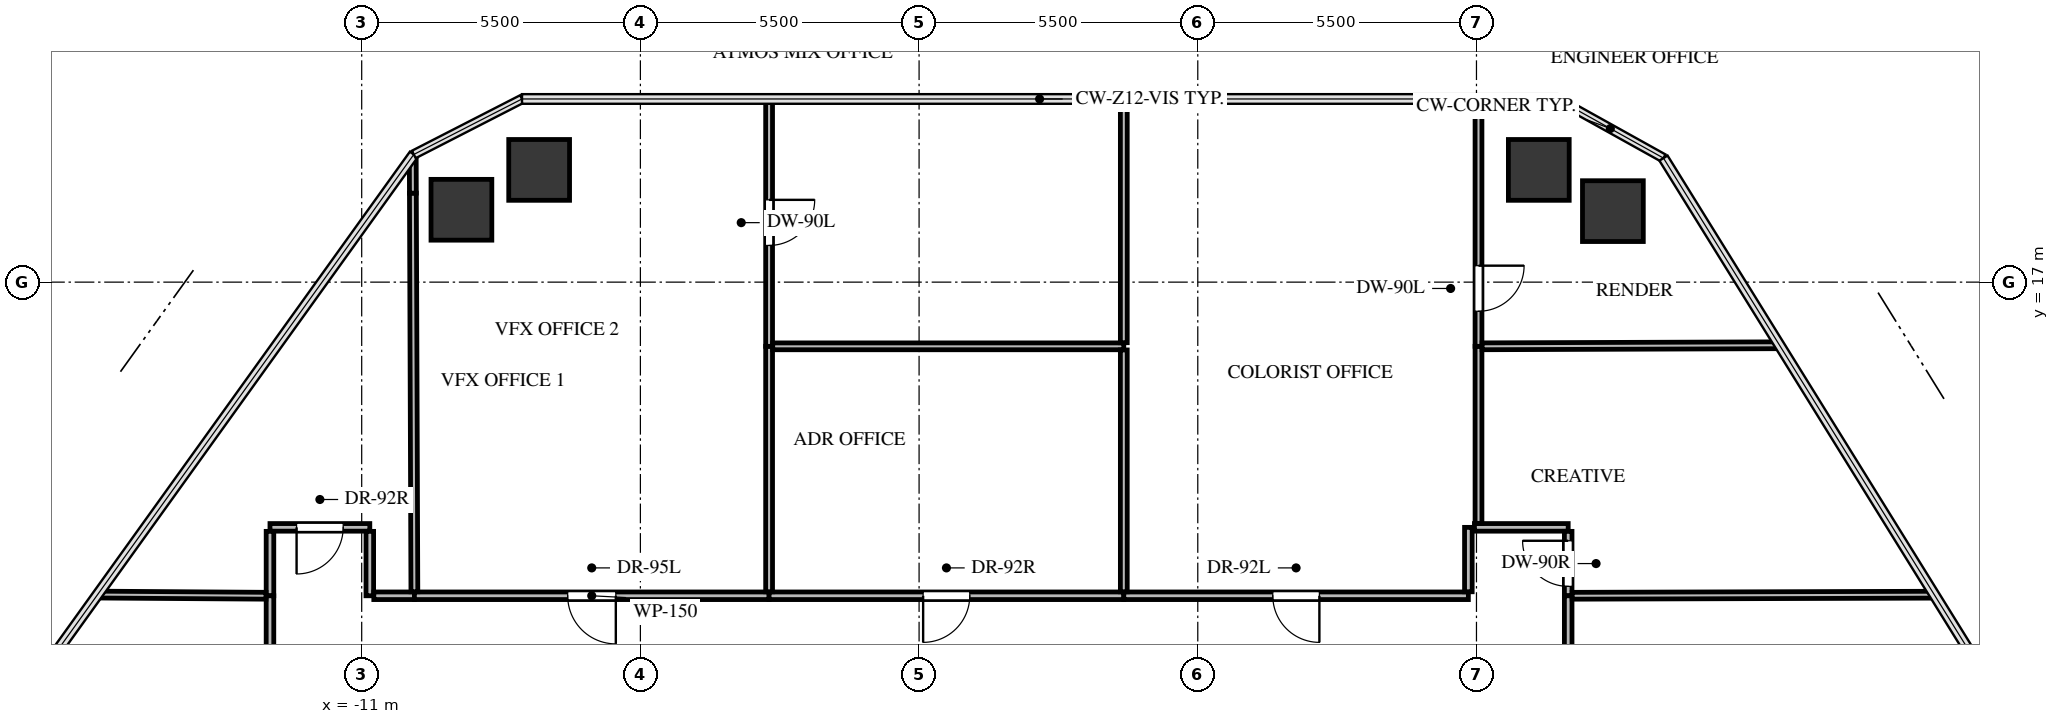
"""IFC4 building model, lengths in metres.
Left out: names, types, materials, properties, quantities, classifications, styles, units other than length and angle.
Written with IfcOpenShell. Run it as: python <this file> out.ifc"""

import sys

from ifc_helpers import new_model, si_unit, direction, frame, frame_2d, origin, origin_2d, place, context, subcontext, project, spatial, rectangle, extrude, source, transform, mapped, element, fill, save


model = new_model("IFC4")
c1 = context("Model", 3, precision=1e-05, world=origin(), true_north=direction((0.0, 1.0)))
c2 = subcontext(c1, "Body", "Model", "MODEL_VIEW")
j1 = project(units=[si_unit("LENGTHUNIT", "METRE"), si_unit("PLANEANGLEUNIT", "RADIAN")], contexts=[c1])
p1 = place(None, origin())
s1 = spatial("IfcSite", under=j1, at=p1, CompositionType="ELEMENT")
p2 = place(p1, origin())
s2 = spatial("IfcBuilding", under=s1, at=p2, CompositionType="ELEMENT")
p3 = place(p2, frame((0.0, 0.0, 110.7)))
s3 = spatial("IfcBuildingStorey", under=s2, at=p3, CompositionType="ELEMENT", Elevation=110.7)
m1 = source(origin(), c2, "Body", "SweptSolid", [
    extrude(rectangle(XDim=1.2, YDim=1.2, at=origin_2d()), origin(), (0.0, 0.0, 1.0), 3.3),
])
for number, where, z_axis, x_axis in (
    (1, (-9.032, 18.428, -0.24), (0.0, 0.0, 1.0), (1.0, 0.0, 0.0)),
    (2, (-7.498, 19.215, -0.24), (0.0, 0.0, 1.0), (1.0, 0.0, 0.0)),
    (3, (12.23, 19.215, -0.24), (0.0, 0.0, 1.0), (1.0, 0.0, 0.0)),
    (4, (13.692, 18.401, -0.24), (0.0, 0.0, 1.0), (1.0, 0.0, 0.0)),
):
    element("IfcColumn", number, at=place(p3, frame(where, z_axis=z_axis, x_axis=x_axis)), inside=s3, PredefinedType="COLUMN", context=c2, shape_type="MappedRepresentation", body=[
        mapped(m1, transform((0.0, 0.0, 0.0), x_axis=(1.0, 0.0, 0.0), y_axis=(0.0, 1.0, 0.0), z_axis=(0.0, 0.0, 1.0), scale=1.0)),
    ])
p4 = place(p3, frame((-10.84, 12.16, 0.0), z_axis=(0.0, 0.0, 1.0), x_axis=(-1.0, 0.0, 0.0)))
e5 = element("IfcWall", 5, at=p4, inside=s3, PredefinedType="PARTITIONING", context=c2, shape_type="SweptSolid", body=[
    extrude(rectangle(XDim=1.97, YDim=0.15, at=frame_2d((0.985, 0.0))), origin(), (0.0, 0.0, 1.0), 3.045),
])
p5 = place(p4, frame((0.525, 0.0, 0.0)))
e6 = element("IfcOpeningElement", 6, at=p5, cuts=e5, PredefinedType="OPENING", context=c2, shape_type="SweptSolid", body=[
    extrude(rectangle(XDim=0.92, YDim=2.1, at=frame_2d((0.46, 1.05))), frame((0.0, 0.085, 0.0), z_axis=(0.0, -1.0, 0.0), x_axis=(1.0, 0.0, 0.0)), (0.0, 0.0, 1.0), 0.17),
])
for number, where, z_axis, x_axis in (
    (7, (-10.84, 10.81, 0.0), (0.0, 0.0, 1.0), (0.0, 1.0, 0.0)),
    (8, (-12.81, 12.081, 0.0), (0.0, 0.0, 1.0), (0.0, -1.0, 0.0)),
):
    element("IfcWall", number, at=place(p3, frame(where, z_axis=z_axis, x_axis=x_axis)), inside=s3, PredefinedType="PARTITIONING", context=c2, shape_type="SweptSolid", body=[
        extrude(rectangle(XDim=1.271, YDim=0.15, at=frame_2d((0.635, 0.0))), origin(), (0.0, 0.0, 1.0), 3.045),
    ])
p6 = place(p3, frame((-9.96, 10.81, 0.0), z_axis=(0.0, 0.0, 1.0), x_axis=(-1.0, 0.0, 0.0)))
e9 = element("IfcWall", 9, at=p6, inside=s3, PredefinedType="PARTITIONING", context=c2, shape_type="SweptSolid", body=[
    extrude(rectangle(XDim=0.801, YDim=0.15, at=frame_2d((0.4, 0.0))), origin(), (0.0, 0.0, 1.0), 3.045),
])
p7 = place(p3, frame((-2.96, 10.81, 0.0), z_axis=(0.0, 0.0, 1.0), x_axis=(-1.0, 0.0, 0.0)))
e10 = element("IfcWall", 10, at=p7, inside=s3, PredefinedType="PARTITIONING", context=c2, shape_type="SweptSolid", body=[
    extrude(rectangle(XDim=7.0, YDim=0.15, at=frame_2d((3.5, 0.0))), origin(), (0.0, 0.0, 1.0), 2.212),
])
p8 = place(p7, frame((3.025, 0.0, 0.0)))
e11 = element("IfcOpeningElement", 11, at=p8, cuts=e10, PredefinedType="OPENING", context=c2, shape_type="SweptSolid", body=[
    extrude(rectangle(XDim=0.95, YDim=2.1, at=frame_2d((0.475, 1.05))), frame((0.0, 0.085, 0.0), z_axis=(0.0, -1.0, 0.0), x_axis=(1.0, 0.0, 0.0)), (0.0, 0.0, 1.0), 0.17),
])
p9 = place(p3, frame((4.04, 10.81, 0.0), z_axis=(0.0, 0.0, 1.0), x_axis=(-1.0, 0.0, 0.0)))
e12 = element("IfcWall", 12, at=p9, inside=s3, PredefinedType="PARTITIONING", context=c2, shape_type="SweptSolid", body=[
    extrude(rectangle(XDim=7.0, YDim=0.15, at=frame_2d((3.5, 0.0))), origin(), (0.0, 0.0, 1.0), 3.045),
])
p10 = place(p9, frame((3.04, 0.0, 0.0)))
e13 = element("IfcOpeningElement", 13, at=p10, cuts=e12, PredefinedType="OPENING", context=c2, shape_type="SweptSolid", body=[
    extrude(rectangle(XDim=0.92, YDim=2.1, at=frame_2d((0.46, 1.05))), frame((0.0, 0.085, 0.0), z_axis=(0.0, -1.0, 0.0), x_axis=(1.0, 0.0, 0.0)), (0.0, 0.0, 1.0), 0.17),
])
p11 = place(p3, frame((10.84, 10.81, 0.0), z_axis=(0.0, 0.0, 1.0), x_axis=(-1.0, 0.0, 0.0)))
e14 = element("IfcWall", 14, at=p11, inside=s3, PredefinedType="PARTITIONING", context=c2, shape_type="SweptSolid", body=[
    extrude(rectangle(XDim=6.8, YDim=0.15, at=frame_2d((3.4, 0.0))), origin(), (0.0, 0.0, 1.0), 2.212),
])
p12 = place(p11, frame((2.94, 0.0, 0.0)))
e15 = element("IfcOpeningElement", 15, at=p12, cuts=e14, PredefinedType="OPENING", context=c2, shape_type="SweptSolid", body=[
    extrude(rectangle(XDim=0.92, YDim=2.1, at=frame_2d((0.46, 1.05))), frame((0.0, 0.085, 0.0), z_axis=(0.0, -1.0, 0.0), x_axis=(1.0, 0.0, 0.0)), (0.0, 0.0, 1.0), 0.17),
])
p13 = place(p3, frame((10.84, 12.16, 0.0), z_axis=(0.0, 0.0, 1.0), x_axis=(0.0, -1.0, 0.0)))
e16 = element("IfcWall", 16, at=p13, inside=s3, PredefinedType="PARTITIONING", context=c2, shape_type="SweptSolid", body=[
    extrude(rectangle(XDim=1.271, YDim=0.15, at=frame_2d((0.635, 0.0))), origin(), (0.0, 0.0, 1.0), 2.212),
])
p14 = place(p3, frame((12.81, 12.16, 0.0), z_axis=(0.0, 0.0, 1.0), x_axis=(-1.0, 0.0, 0.0)))
e17 = element("IfcWall", 17, at=p14, inside=s3, PredefinedType="PARTITIONING", context=c2, shape_type="SweptSolid", body=[
    extrude(rectangle(XDim=1.85, YDim=0.15, at=frame_2d((0.925, 0.0))), origin(), (0.0, 0.0, 1.0), 2.212),
])
p15 = place(p3, frame((12.81, 10.81, 0.0), z_axis=(0.0, 0.0, 1.0), x_axis=(0.0, 1.0, 0.0)))
e18 = element("IfcWall", 18, at=p15, inside=s3, PredefinedType="PARTITIONING", context=c2, shape_type="SweptSolid", body=[
    extrude(rectangle(XDim=1.271, YDim=0.15, at=frame_2d((0.635, 0.0))), origin(), (0.0, 0.0, 1.0), 3.045),
])
p16 = place(p15, frame((0.186, 0.0, 0.0)))
e19 = element("IfcOpeningElement", 19, at=p16, cuts=e18, PredefinedType="OPENING", context=c2, shape_type="SweptSolid", body=[
    extrude(rectangle(XDim=0.9, YDim=2.05, at=frame_2d((0.45, 1.025))), frame((0.0, 0.085, 0.0), z_axis=(0.0, -1.0, 0.0), x_axis=(1.0, 0.0, 0.0)), (0.0, 0.0, 1.0), 0.17),
])
p17 = place(p3, frame((-12.81, 10.81, 0.0), z_axis=(0.0, 0.0, 1.0), x_axis=(0.0, -1.0, 0.0)))
e20 = element("IfcWall", 20, at=p17, inside=s3, PredefinedType="PARTITIONING", context=c2, shape_type="SweptSolid", body=[
    extrude(rectangle(XDim=6.27, YDim=0.15, at=frame_2d((3.135, 0.0))), origin(), (0.0, 0.0, 1.0), 3.045),
])
p18 = place(p17, frame((2.675, 0.0, 0.0)))
e21 = element("IfcOpeningElement", 21, at=p18, cuts=e20, PredefinedType="OPENING", context=c2, shape_type="SweptSolid", body=[
    extrude(rectangle(XDim=0.92, YDim=2.1, at=frame_2d((0.46, 1.05))), frame((0.0, 0.085, 0.0), z_axis=(0.0, -1.0, 0.0), x_axis=(1.0, 0.0, 0.0)), (0.0, 0.0, 1.0), 0.17),
])
p19 = place(p3, frame((12.81, 5.04, 0.0), z_axis=(0.0, 0.0, 1.0), x_axis=(0.0, 1.0, 0.0)))
e22 = element("IfcWall", 22, at=p19, inside=s3, PredefinedType="PARTITIONING", context=c2, shape_type="SweptSolid", body=[
    extrude(rectangle(XDim=5.77, YDim=0.15, at=frame_2d((2.885, 0.0))), origin(), (0.0, 0.0, 1.0), 3.045),
])
p20 = place(p19, frame((2.425, 0.0, 0.0)))
e23 = element("IfcOpeningElement", 23, at=p20, cuts=e22, PredefinedType="OPENING", context=c2, shape_type="SweptSolid", body=[
    extrude(rectangle(XDim=0.92, YDim=2.1, at=frame_2d((0.46, 1.05))), frame((0.0, 0.085, 0.0), z_axis=(0.0, -1.0, 0.0), x_axis=(1.0, 0.0, 0.0)), (0.0, 0.0, 1.0), 0.17),
])
p21 = place(p3, frame((-9.99, 18.756, 0.0), z_axis=(0.0, 0.0, 1.0), x_axis=(0.003754822251, -0.99999295063, 0.0)))
e24 = element("IfcWall", 24, at=p21, inside=s3, PredefinedType="PARTITIONING", context=c2, shape_type="SweptSolid", body=[
    extrude(rectangle(XDim=7.867, YDim=0.135, at=frame_2d((3.934, 0.0))), origin(), (0.0, 0.0, 1.0), 2.38),
])
p22 = place(p3, frame((-9.992, 19.479, 0.0), z_axis=(0.0, 0.0, 1.0), x_axis=(0.003718703158, -0.9999930856, 0.0)))
e25 = element("IfcWall", 25, at=p22, inside=s3, PredefinedType="PARTITIONING", context=c2, shape_type="SweptSolid", body=[
    extrude(rectangle(XDim=0.722, YDim=0.135, at=frame_2d((0.361, 0.0))), origin(), (0.0, 0.0, 1.0), 1.877),
])
p23 = place(p3, frame((-12.889, 10.811, 0.0), z_axis=(0.0, 0.0, 1.0), x_axis=(-0.999976657862, 0.006832549348, 0.0)))
e26 = element("IfcWall", 26, at=p23, inside=s3, PredefinedType="PARTITIONING", context=c2, shape_type="SweptSolid", body=[
    extrude(rectangle(XDim=3.323, YDim=0.135, at=frame_2d((1.662, 0.0))), origin(), (0.0, 0.0, 1.0), 2.38),
])
p24 = place(p3, frame((-2.96, 15.733, 0.0), z_axis=(0.0, 0.0, 1.0), x_axis=(0.0, -1.0, 0.0)))
e27 = element("IfcWall", 27, at=p24, inside=s3, PredefinedType="PARTITIONING", context=c2, shape_type="SweptSolid", body=[
    extrude(rectangle(XDim=4.844, YDim=0.135, at=frame_2d((2.422, 0.0))), origin(), (0.0, 0.0, 1.0), 3.045),
])
p25 = place(p3, frame((-2.96, 20.615, 0.0), z_axis=(0.0, 0.0, 1.0), x_axis=(0.0, -1.0, 0.0)))
e28 = element("IfcWall", 28, at=p25, inside=s3, PredefinedType="PARTITIONING", context=c2, shape_type="SweptSolid", body=[
    extrude(rectangle(XDim=4.882, YDim=0.135, at=frame_2d((2.441, 0.0))), origin(), (0.0, 0.0, 1.0), 2.38),
])
p26 = place(p25, frame((1.991, 0.0, 0.0)))
e29 = element("IfcOpeningElement", 29, at=p26, cuts=e28, PredefinedType="OPENING", context=c2, shape_type="SweptSolid", body=[
    extrude(rectangle(XDim=0.9, YDim=2.05, at=frame_2d((0.45, 1.025))), frame((0.0, 0.078, 0.0), z_axis=(0.0, -1.0, 0.0), x_axis=(1.0, 0.0, 0.0)), (0.0, 0.0, 1.0), 0.155),
])
p27 = place(p3, frame((-2.888, 15.733, 0.0), z_axis=(0.0, 0.0, 1.0), x_axis=(1.0, 0.0, 0.0)))
e30 = element("IfcWall", 30, at=p27, inside=s3, PredefinedType="PARTITIONING", context=c2, shape_type="SweptSolid", body=[
    extrude(rectangle(XDim=6.928, YDim=0.135, at=frame_2d((3.464, 0.0))), origin(), (0.0, 0.0, 1.0), 3.045),
])
p28 = place(p3, frame((4.04, 15.662, 0.0), z_axis=(0.0, 0.0, 1.0), x_axis=(0.0, -1.0, 0.0)))
e31 = element("IfcWall", 31, at=p28, inside=s3, PredefinedType="PARTITIONING", context=c2, shape_type="SweptSolid", body=[
    extrude(rectangle(XDim=4.773, YDim=0.135, at=frame_2d((2.386, 0.0))), origin(), (0.0, 0.0, 1.0), 3.045),
])
p29 = place(p3, frame((4.04, 20.615, 0.0), z_axis=(0.0, 0.0, 1.0), x_axis=(0.0, -1.0, 0.0)))
e32 = element("IfcWall", 32, at=p29, inside=s3, PredefinedType="PARTITIONING", context=c2, shape_type="SweptSolid", body=[
    extrude(rectangle(XDim=4.811, YDim=0.135, at=frame_2d((2.405, 0.0))), origin(), (0.0, 0.0, 1.0), 2.38),
])
p30 = place(p3, frame((11.04, 15.733, 0.0), z_axis=(0.0, 0.0, 1.0), x_axis=(0.0, -1.0, 0.0)))
e33 = element("IfcWall", 33, at=p30, inside=s3, PredefinedType="PARTITIONING", context=c2, shape_type="SweptSolid", body=[
    extrude(rectangle(XDim=3.494, YDim=0.135, at=frame_2d((1.747, 0.0))), origin(), (0.0, 0.0, 1.0), 2.212),
])
p31 = place(p3, frame((11.04, 20.615, 0.0), z_axis=(0.0, 0.0, 1.0), x_axis=(0.0, -1.0, 0.0)))
e34 = element("IfcWall", 34, at=p31, inside=s3, PredefinedType="PARTITIONING", context=c2, shape_type="SweptSolid", body=[
    extrude(rectangle(XDim=4.882, YDim=0.135, at=frame_2d((2.441, 0.0))), origin(), (0.0, 0.0, 1.0), 2.38),
])
p32 = place(p31, frame((3.29, 0.0, 0.0)))
e35 = element("IfcOpeningElement", 35, at=p32, cuts=e34, PredefinedType="OPENING", context=c2, shape_type="SweptSolid", body=[
    extrude(rectangle(XDim=0.9, YDim=2.05, at=frame_2d((0.45, 1.025))), frame((0.0, 0.078, 0.0), z_axis=(0.0, -1.0, 0.0), x_axis=(1.0, 0.0, 0.0)), (0.0, 0.0, 1.0), 0.155),
])
p33 = place(p3, frame((11.112, 15.733, 0.0), z_axis=(0.0, 0.0, 1.0), x_axis=(0.99999375129, 0.003535163403, 0.0)))
e36 = element("IfcWall", 36, at=p33, inside=s3, PredefinedType="PARTITIONING", context=c2, shape_type="SweptSolid", body=[
    extrude(rectangle(XDim=5.87, YDim=0.135, at=frame_2d((2.935, 0.0))), origin(), (0.0, 0.0, 1.0), 2.212),
])
p34 = place(p3, frame((20.035, 10.831, 0.0), z_axis=(0.0, 0.0, 1.0), x_axis=(-0.999995783715, -0.002903885812, 0.0)))
e37 = element("IfcWall", 37, at=p34, inside=s3, PredefinedType="PARTITIONING", context=c2, shape_type="SweptSolid", body=[
    extrude(rectangle(XDim=7.146, YDim=0.135, at=frame_2d((3.573, 0.0))), origin(), (0.0, 0.0, 1.0), 2.38),
])
m2 = source(origin(), c2, "Body", "SweptSolid", [
    extrude(rectangle(XDim=0.92, YDim=2.1, at=frame_2d((0.46, 1.05))), frame((0.0, 0.025, 0.0), z_axis=(0.0, -1.0, 0.0), x_axis=(1.0, 0.0, 0.0)), (0.0, 0.0, 1.0), 0.05),
])
p35 = place(p5, origin())
e38 = element("IfcDoor", 38, at=p35, inside=s3, OperationType="SINGLE_SWING_RIGHT", PredefinedType="DOOR", context=c2, shape_type="MappedRepresentation", body=[
    mapped(m2, transform((0.0, 0.0, 0.0), x_axis=(1.0, 0.0, 0.0), y_axis=(0.0, 1.0, 0.0), z_axis=(0.0, 0.0, 1.0), scale=1.0)),
])
fill(e6, e38)
m3 = source(origin(), c2, "Body", "SweptSolid", [
    extrude(rectangle(XDim=0.95, YDim=2.1, at=frame_2d((0.475, 1.05))), frame((0.0, 0.025, 0.0), z_axis=(0.0, -1.0, 0.0), x_axis=(1.0, 0.0, 0.0)), (0.0, 0.0, 1.0), 0.05),
])
p36 = place(p8, origin())
e39 = element("IfcDoor", 39, at=p36, inside=s3, OperationType="SINGLE_SWING_LEFT", PredefinedType="DOOR", context=c2, shape_type="MappedRepresentation", body=[
    mapped(m3, transform((0.0, 0.0, 0.0), x_axis=(1.0, 0.0, 0.0), y_axis=(0.0, 1.0, 0.0), z_axis=(0.0, 0.0, 1.0), scale=1.0)),
])
fill(e11, e39)
p37 = place(p10, origin())
e40 = element("IfcDoor", 40, at=p37, inside=s3, OperationType="SINGLE_SWING_RIGHT", PredefinedType="DOOR", context=c2, shape_type="MappedRepresentation", body=[
    mapped(m2, transform((0.0, 0.0, 0.0), x_axis=(1.0, 0.0, 0.0), y_axis=(0.0, 1.0, 0.0), z_axis=(0.0, 0.0, 1.0), scale=1.0)),
])
fill(e13, e40)
m4 = source(origin(), c2, "Body", "SweptSolid", [
    extrude(rectangle(XDim=0.92, YDim=2.1, at=frame_2d((0.46, 1.05))), frame((0.0, 0.025, 0.0), z_axis=(0.0, -1.0, 0.0), x_axis=(1.0, 0.0, 0.0)), (0.0, 0.0, 1.0), 0.05),
])
p38 = place(p12, origin())
e41 = element("IfcDoor", 41, at=p38, inside=s3, OperationType="SINGLE_SWING_LEFT", PredefinedType="DOOR", context=c2, shape_type="MappedRepresentation", body=[
    mapped(m4, transform((0.0, 0.0, 0.0), x_axis=(1.0, 0.0, 0.0), y_axis=(0.0, 1.0, 0.0), z_axis=(0.0, 0.0, 1.0), scale=1.0)),
])
fill(e15, e41)
m5 = source(origin(), c2, "Body", "SweptSolid", [
    extrude(rectangle(XDim=0.9, YDim=2.05, at=frame_2d((0.45, 1.025))), frame((0.0, 0.025, 0.0), z_axis=(0.0, -1.0, 0.0), x_axis=(1.0, 0.0, 0.0)), (0.0, 0.0, 1.0), 0.05),
])
p39 = place(p16, origin())
e42 = element("IfcDoor", 42, at=p39, inside=s3, OperationType="SINGLE_SWING_RIGHT", PredefinedType="DOOR", context=c2, shape_type="MappedRepresentation", body=[
    mapped(m5, transform((0.0, 0.0, 0.0), x_axis=(1.0, 0.0, 0.0), y_axis=(0.0, 1.0, 0.0), z_axis=(0.0, 0.0, 1.0), scale=1.0)),
])
fill(e19, e42)
m6 = source(origin(), c2, "Body", "SweptSolid", [
    extrude(rectangle(XDim=0.9, YDim=2.05, at=frame_2d((0.45, 1.025))), frame((0.0, 0.025, 0.0), z_axis=(0.0, -1.0, 0.0), x_axis=(1.0, 0.0, 0.0)), (0.0, 0.0, 1.0), 0.05),
])
p40 = place(p26, origin())
e43 = element("IfcDoor", 43, at=p40, inside=s3, OperationType="SINGLE_SWING_LEFT", PredefinedType="DOOR", context=c2, shape_type="MappedRepresentation", body=[
    mapped(m6, transform((0.0, 0.0, 0.0), x_axis=(1.0, 0.0, 0.0), y_axis=(0.0, 1.0, 0.0), z_axis=(0.0, 0.0, 1.0), scale=1.0)),
])
fill(e29, e43)
p41 = place(p32, origin())
e44 = element("IfcDoor", 44, at=p41, inside=s3, OperationType="SINGLE_SWING_LEFT", PredefinedType="DOOR", context=c2, shape_type="MappedRepresentation", body=[
    mapped(m6, transform((0.0, 0.0, 0.0), x_axis=(1.0, 0.0, 0.0), y_axis=(0.0, 1.0, 0.0), z_axis=(0.0, 0.0, 1.0), scale=1.0)),
])
fill(e35, e44)
save(model, sys.argv[1])
